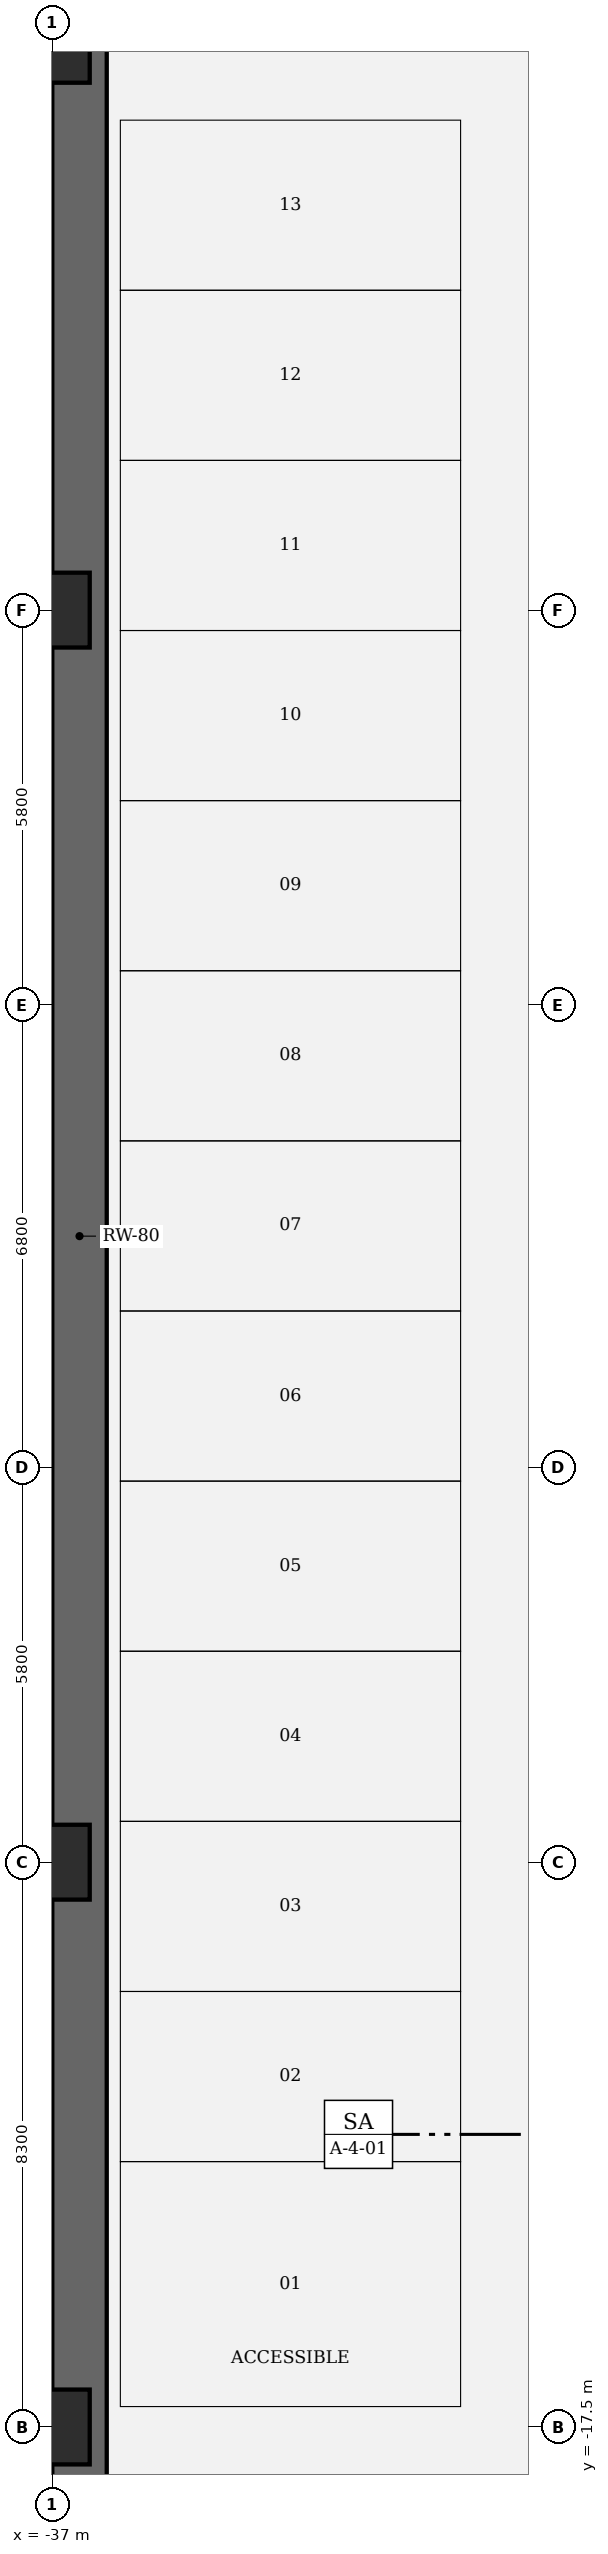
"""IFC4 building model, lengths in metres.
Left out: names, types, materials, properties, quantities, classifications, styles, units other than length and angle.
Written with IfcOpenShell. Run it as: python <this file> out.ifc"""

import sys

from ifc_helpers import new_model, si_unit, direction, frame, frame_2d, origin, origin_2d, place, context, subcontext, project, spatial, rectangle, extrude, element, save


model = new_model("IFC4")
c1 = context("Model", 3, precision=1e-05, world=origin(), true_north=direction((0.0, 1.0)))
c2 = subcontext(c1, "Body", "Model", "MODEL_VIEW")
j1 = project(units=[si_unit("LENGTHUNIT", "METRE"), si_unit("PLANEANGLEUNIT", "RADIAN")], contexts=[c1])
p1 = place(None, origin())
s1 = spatial("IfcSite", under=j1, at=p1, CompositionType="ELEMENT")
p2 = place(p1, origin())
s2 = spatial("IfcBuilding", under=s1, at=p2, CompositionType="ELEMENT")
p3 = place(p2, frame((0.0, 0.0, -4.8)))
s3 = spatial("IfcBuildingStorey", under=s2, at=p3, CompositionType="ELEMENT", Elevation=-4.8)
for number, where, z_axis, x_axis in (
    (1, (-37.0, -17.5, 0.0), (0.0, 0.0, 1.0), (1.0, 0.0, 0.0)),
    (2, (-37.0, -9.2, 0.0), (0.0, 0.0, 1.0), (1.0, 0.0, 0.0)),
    (3, (-37.0, 9.2, 0.0), (0.0, 0.0, 1.0), (1.0, 0.0, 0.0)),
    (4, (-37.0, 17.5, 0.0), (0.0, 0.0, 1.0), (1.0, 0.0, 0.0)),
):
    element("IfcColumn", number, at=place(p3, frame(where, z_axis=z_axis, x_axis=x_axis)), inside=s3, PredefinedType="COLUMN", context=c2, shape_type="SweptSolid", body=[
        extrude(rectangle(XDim=1.1, YDim=1.1, at=origin_2d()), origin(), (0.0, 0.0, 1.0), 4.8),
    ])
p4 = place(p3, frame((-36.6, -24.2, 0.0), z_axis=(0.0, 0.0, 1.0), x_axis=(0.0, 1.0, 0.0)))
e5 = element("IfcWall", 5, at=p4, inside=s3, PredefinedType="USERDEFINED", context=c2, shape_type="SweptSolid", body=[
    extrude(rectangle(XDim=48.4, YDim=0.8, at=frame_2d((24.2, 0.0))), origin(), (0.0, 0.0, 1.0), 4.8),
])
save(model, sys.argv[1])
